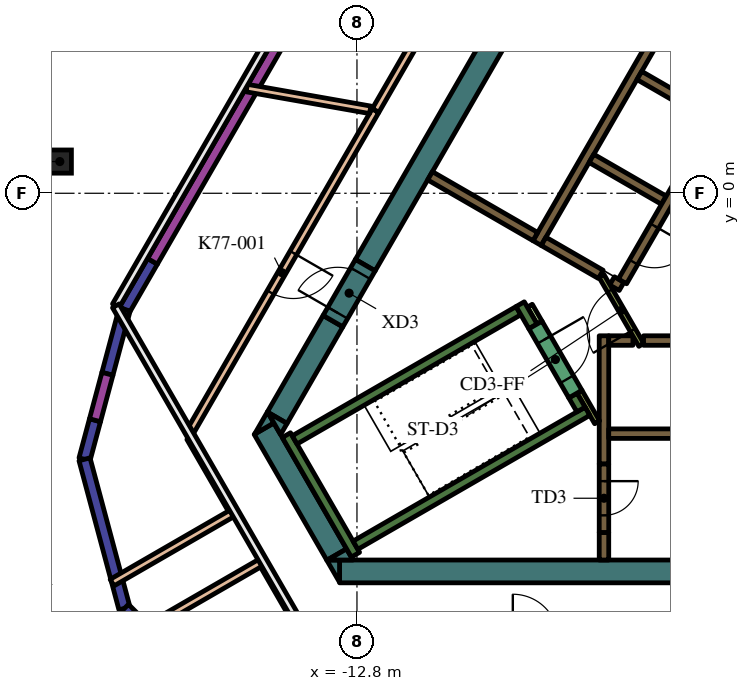
"""IFC4 building model, lengths in metres.
Left out: names, types, materials, properties, quantities, classifications, styles, units other than length and angle.
Written with IfcOpenShell. Run it as: python <this file> out.ifc"""

import sys

from ifc_helpers import new_model, si_unit, direction, frame, frame_2d, origin, origin_2d, place, context, subcontext, project, spatial, polyline, rectangle, hollow_circle, outline, extrude, element, fill, save


model = new_model("IFC4")
c1 = context("Model", 3, precision=1e-05, world=origin(), true_north=direction((0.0, 1.0)))
c2 = subcontext(c1, "Body", "Model", "MODEL_VIEW")
j1 = project(units=[si_unit("LENGTHUNIT", "METRE"), si_unit("PLANEANGLEUNIT", "RADIAN")], contexts=[c1])
p1 = place(None, origin())
s1 = spatial("IfcSite", under=j1, at=p1, CompositionType="ELEMENT")
p2 = place(p1, origin())
s2 = spatial("IfcBuilding", under=s1, at=p2, CompositionType="ELEMENT")
p3 = place(p2, frame((0.0, 0.0, 331.8)))
s3 = spatial("IfcBuildingStorey", under=s2, at=p3, CompositionType="ELEMENT", Elevation=331.8)
p4 = place(p3, frame((-20.619, 0.834, 0.0), z_axis=(0.0, 0.0, 1.0), x_axis=(1.0, 0.0, 0.0)))
e1 = element("IfcColumn", 1, at=p4, inside=s3, PredefinedType="COLUMN", context=c2, shape_type="SweptSolid", body=[
    extrude(hollow_circle(Radius=0.305, WallThickness=0.025, at=origin_2d()), origin(), (0.0, 0.0, 1.0), 4.2),
])
p5 = place(p3, frame((8.904, -9.95, 0.0), z_axis=(0.0, 0.0, 1.0), x_axis=(-1.0, 0.0, 0.0)))
e2 = element("IfcWall", 2, at=p5, inside=s3, PredefinedType="SOLIDWALL", context=c2, shape_type="SweptSolid", body=[
    extrude(rectangle(XDim=22.161, YDim=0.6, at=frame_2d((11.081, 0.0))), origin(), (0.0, 0.0, 1.0), 4.2),
])
p6 = place(p3, origin())
e3 = element("IfcWall", 3, at=p6, inside=s3, PredefinedType="SOLIDWALL", context=c2, shape_type="SweptSolid", body=[
    extrude(outline(polyline([(-13.597, -9.65), (-13.259, -9.65), (-13.259, -10.236), (-13.597, -9.65)])), origin(), (0.0, 0.0, 1.0), 4.2),
])
p7 = place(p3, frame((-13.333, -9.506, 0.0), z_axis=(0.0, 0.0, 1.0), x_axis=(-0.500019073792, 0.866014391245, 0.0)))
e4 = element("IfcWall", 4, at=p7, inside=s3, PredefinedType="SOLIDWALL", context=c2, shape_type="SweptSolid", body=[
    extrude(rectangle(XDim=3.823, YDim=0.6, at=frame_2d((1.912, 0.0))), origin(), (0.0, 0.0, 1.0), 4.2),
])
e5 = element("IfcWall", 5, at=p6, inside=s3, PredefinedType="SOLIDWALL", context=c2, shape_type="SweptSolid", body=[
    extrude(outline(polyline([(-14.987, -6.043), (-15.493, -6.335), (-15.156, -5.75), (-14.987, -6.043)])), origin(), (0.0, 0.0, 1.0), 4.2),
])
e6 = element("IfcWall", 6, at=p6, inside=s3, PredefinedType="SOLIDWALL", context=c2, shape_type="SweptSolid", body=[
    extrude(outline(polyline([(-12.904, -9.65), (-13.58, -9.65), (-13.073, -9.357), (-12.904, -9.65)])), origin(), (0.0, 0.0, 1.0), 4.2),
])
p8 = place(p3, frame((-13.432, -3.364, 0.0), z_axis=(0.0, 0.0, 1.0), x_axis=(-0.499960127962, -0.866048422692, 0.0)))
e7 = element("IfcWall", 7, at=p8, inside=s3, PredefinedType="SOLIDWALL", context=c2, shape_type="SweptSolid", body=[
    extrude(rectangle(XDim=2.934, YDim=0.6, at=frame_2d((1.467, 0.0))), origin(), (0.0, 0.0, 1.0), 4.2),
])
e8 = element("IfcWall", 8, at=p6, inside=s3, PredefinedType="SOLIDWALL", context=c2, shape_type="SweptSolid", body=[
    extrude(outline(polyline([(-14.809, -6.35), (-15.147, -5.764), (-14.64, -6.057), (-14.809, -6.35)])), origin(), (0.0, 0.0, 1.0), 4.2),
])
p9 = place(p3, frame((-4.652, 11.842, 0.0), z_axis=(0.0, 0.0, 1.0), x_axis=(-0.500003640647, -0.866023301845, 0.0)))
e9 = element("IfcWall", 9, at=p9, inside=s3, PredefinedType="SOLIDWALL", context=c2, shape_type="SweptSolid", body=[
    extrude(rectangle(XDim=15.858, YDim=0.6, at=frame_2d((7.929, 0.0))), origin(), (0.0, 0.0, 1.0), 4.2),
])
p10 = place(p3, frame((-12.84, -9.511, 0.0), z_axis=(0.0, 0.0, 1.0), x_axis=(-0.499997733992, 0.866026712061, 0.0)))
e10 = element("IfcWall", 10, at=p10, inside=s3, PredefinedType="SOLIDWALL", context=c2, shape_type="SweptSolid", body=[
    extrude(rectangle(XDim=3.634, YDim=0.25, at=frame_2d((1.817, 0.0))), origin(), (0.0, 0.0, 1.0), 4.2),
])
p11 = place(p3, frame((-14.44, -6.49, 0.0), z_axis=(0.0, 0.0, 1.0), x_axis=(0.866022966069, 0.500004222222, 0.0)))
e11 = element("IfcWall", 11, at=p11, inside=s3, PredefinedType="SOLIDWALL", context=c2, shape_type="SweptSolid", body=[
    extrude(rectangle(XDim=6.8, YDim=0.25, at=frame_2d((3.4, 0.0))), origin(), (0.0, 0.0, 1.0), 4.2),
])
p12 = place(p3, frame((-8.168, -3.503, 0.0), z_axis=(0.0, 0.0, 1.0), x_axis=(-0.499952099219, 0.866053057547, 0.0)))
e12 = element("IfcWall", 12, at=p12, inside=s3, PredefinedType="SOLIDWALL", context=c2, shape_type="SweptSolid", body=[
    extrude(rectangle(XDim=0.675, YDim=0.25, at=frame_2d((0.337, 0.0))), origin(), (0.0, 0.0, 1.0), 4.2),
])
p13 = place(p3, frame((-12.84, -9.261, 0.0), z_axis=(0.0, 0.0, 1.0), x_axis=(0.866016039709, 0.500016218704, 0.0)))
e13 = element("IfcWall", 13, at=p13, inside=s3, PredefinedType="SOLIDWALL", context=c2, shape_type="SweptSolid", body=[
    extrude(rectangle(XDim=7.05, YDim=0.25, at=frame_2d((3.525, 0.0))), origin(), (0.0, 0.0, 1.0), 4.2),
])
p14 = place(p3, frame((-6.905, -5.69, 0.0), z_axis=(0.0, 0.0, 1.0), x_axis=(-0.500402024738, 0.865793170242, 0.0)))
e14 = element("IfcWall", 14, at=p14, inside=s3, PredefinedType="SOLIDWALL", context=c2, shape_type="SweptSolid", body=[
    extrude(rectangle(XDim=0.425, YDim=0.25, at=frame_2d((0.212, 0.0))), origin(), (0.0, 0.0, 1.0), 4.2),
])
p15 = place(p3, frame((-5.259, -3.875, 0.0), z_axis=(0.0, 0.0, 1.0), x_axis=(1.0, 0.0, 0.0)))
e15 = element("IfcWall", 15, at=p15, inside=s3, PredefinedType="SOLIDWALL", context=c2, shape_type="SweptSolid", body=[
    extrude(rectangle(XDim=10.489, YDim=0.25, at=frame_2d((5.244, 0.0))), origin(), (0.0, 0.0, 1.0), 4.2),
])
p16 = place(p3, frame((-6.3, -7.125, 0.0), z_axis=(0.0, 0.0, 1.0), x_axis=(0.0, 1.0, 0.0)))
e16 = element("IfcWall", 16, at=p16, inside=s3, PredefinedType="SOLIDWALL", context=c2, shape_type="SweptSolid", body=[
    extrude(rectangle(XDim=3.375, YDim=0.25, at=frame_2d((1.687, 0.0))), origin(), (0.0, 0.0, 1.0), 4.2),
])
p17 = place(p3, frame((-6.175, -3.875, 0.0), z_axis=(0.0, 0.0, 1.0), x_axis=(1.0, 0.0, 0.0)))
e17 = element("IfcWall", 17, at=p17, inside=s3, PredefinedType="SOLIDWALL", context=c2, shape_type="SweptSolid", body=[
    extrude(rectangle(XDim=0.637, YDim=0.25, at=frame_2d((0.318, 0.0))), origin(), (0.0, 0.0, 1.0), 4.2),
])
p18 = place(p3, frame((-6.3, -8.925, 0.0), z_axis=(0.0, 0.0, 1.0), x_axis=(0.0, -1.0, 0.0)))
e18 = element("IfcWall", 18, at=p18, inside=s3, PredefinedType="SOLIDWALL", context=c2, shape_type="SweptSolid", body=[
    extrude(rectangle(XDim=0.725, YDim=0.25, at=frame_2d((0.363, 0.0))), origin(), (0.0, 0.0, 1.0), 4.2),
])
p19 = place(p3, frame((-8.06, -1.311, 0.0), z_axis=(0.0, 0.0, 1.0), x_axis=(0.50000273126, 0.866023826885, 0.0)))
e19 = element("IfcWall", 19, at=p19, inside=s3, PredefinedType="SOLIDWALL", context=c2, shape_type="SweptSolid", body=[
    extrude(rectangle(XDim=10.33, YDim=0.25, at=frame_2d((5.165, 0.0))), origin(), (0.0, 0.0, 1.0), 4.2),
])
for number, where, z_axis, x_axis in (
    (20, (-5.369, 3.1, 0.0), (0.0, 0.0, 1.0), (0.866, -0.5, 0.0)),
    (21, (-4.724, -0.182, 0.0), (0.0, 0.0, 1.0), (-0.866, 0.5, 0.0)),
):
    element("IfcWall", number, at=place(p3, frame(where, z_axis=z_axis, x_axis=x_axis)), inside=s3, PredefinedType="SOLIDWALL", context=c2, shape_type="SweptSolid", body=[
        extrude(rectangle(XDim=2.2, YDim=0.25, at=frame_2d((1.1, 0.0))), origin(), (0.0, 0.0, 1.0), 4.2),
    ])
p20 = place(p3, frame((-6.088, -2.305, 0.0), z_axis=(0.0, 0.0, 1.0), x_axis=(0.866059450854, -0.499941024108, 0.0)))
e22 = element("IfcWall", 22, at=p20, inside=s3, PredefinedType="SOLIDWALL", context=c2, shape_type="SweptSolid", body=[
    extrude(rectangle(XDim=0.29, YDim=0.25, at=frame_2d((0.145, 0.0))), origin(), (0.0, 0.0, 1.0), 4.2),
])
p21 = place(p3, frame((-7.889, -1.265, 0.0), z_axis=(0.0, 0.0, 1.0), x_axis=(0.865986741702, -0.500066958712, 0.0)))
e23 = element("IfcWall", 23, at=p21, inside=s3, PredefinedType="SOLIDWALL", context=c2, shape_type="SweptSolid", body=[
    extrude(rectangle(XDim=1.738, YDim=0.25, at=frame_2d((0.869, 0.0))), origin(), (0.0, 0.0, 1.0), 4.2),
])
p22 = place(p3, frame((-8.106, -1.14, 0.0), z_axis=(0.0, 0.0, 1.0), x_axis=(-0.866008981251, 0.500028443584, 0.0)))
e24 = element("IfcWall", 24, at=p22, inside=s3, PredefinedType="SOLIDWALL", context=c2, shape_type="SweptSolid", body=[
    extrude(rectangle(XDim=3.2, YDim=0.25, at=frame_2d((1.6, 0.0))), origin(), (0.0, 0.0, 1.0), 4.2),
])
p23 = place(p3, frame((-8.252, -2.958, 0.0), z_axis=(0.0, 0.0, 1.0), x_axis=(0.500174715838, -0.865924508047, 0.0)))
e25 = element("IfcWall", 25, at=p23, inside=s3, PredefinedType="PARTITIONING", context=c2, shape_type="SweptSolid", body=[
    extrude(rectangle(XDim=0.514, YDim=0.15, at=frame_2d((0.257, 0.0))), origin(), (0.0, 0.0, 1.0), 3.45),
])
p24 = place(p3, frame((-6.48, -6.027, 0.0), z_axis=(0.0, 0.0, 1.0), x_axis=(-0.499927229454, 0.866067413802, 0.0)))
e26 = element("IfcWall", 26, at=p24, inside=s3, PredefinedType="PARTITIONING", context=c2, shape_type="SweptSolid", body=[
    extrude(rectangle(XDim=0.929, YDim=0.15, at=frame_2d((0.464, 0.0))), origin(), (0.0, 0.0, 1.0), 4.2),
])
p25 = place(p3, frame((-6.175, -6.325, 0.0), z_axis=(0.0, 0.0, 1.0), x_axis=(1.0, 0.0, 0.0)))
e27 = element("IfcWall", 27, at=p25, inside=s3, PredefinedType="SOLIDWALL", context=c2, shape_type="SweptSolid", body=[
    extrude(rectangle(XDim=12.35, YDim=0.25, at=frame_2d((6.175, 0.0))), origin(), (0.0, 0.0, 1.0), 4.2),
])
p26 = place(p25, frame((3.205, 0.0, 0.0)))
e28 = element("IfcOpeningElement", 28, at=p26, cuts=e27, PredefinedType="OPENING", context=c2, shape_type="SweptSolid", body=[
    extrude(rectangle(XDim=0.9, YDim=2.1, at=frame_2d((0.45, 1.05))), frame((0.0, 0.135, 0.0), z_axis=(0.0, -1.0, 0.0), x_axis=(1.0, 0.0, 0.0)), (0.0, 0.0, 1.0), 0.27),
])
p27 = place(p25, frame((8.145, 0.0, 0.0)))
e29 = element("IfcOpeningElement", 29, at=p27, cuts=e27, PredefinedType="OPENING", context=c2, shape_type="SweptSolid", body=[
    extrude(rectangle(XDim=1.1, YDim=2.1, at=frame_2d((0.55, 1.05))), frame((0.0, 0.135, 0.0), z_axis=(0.0, -1.0, 0.0), x_axis=(1.0, 0.0, 0.0)), (0.0, 0.0, 1.0), 0.27),
])
p28 = place(p25, frame((10.665, 0.0, 0.0)))
e30 = element("IfcOpeningElement", 30, at=p28, cuts=e27, PredefinedType="OPENING", context=c2, shape_type="SweptSolid", body=[
    extrude(rectangle(XDim=1.1, YDim=2.1, at=frame_2d((0.55, 1.05))), frame((0.0, 0.135, 0.0), z_axis=(0.0, -1.0, 0.0), x_axis=(1.0, 0.0, 0.0)), (0.0, 0.0, 1.0), 0.27),
])
p29 = place(p3, frame((-0.898, 6.194, 0.0), z_axis=(0.0, 0.0, 1.0), x_axis=(-0.499996202215, -0.866027596426, 0.0)))
e31 = element("IfcWall", 31, at=p29, inside=s3, PredefinedType="SOLIDWALL", context=c2, shape_type="SweptSolid", body=[
    extrude(rectangle(XDim=9.83, YDim=0.25, at=frame_2d((4.915, 0.0))), origin(), (0.0, 0.0, 1.0), 4.2),
])
p30 = place(p29, frame((0.585, 0.0, 0.0)))
e32 = element("IfcOpeningElement", 32, at=p30, cuts=e31, PredefinedType="OPENING", context=c2, shape_type="SweptSolid", body=[
    extrude(rectangle(XDim=1.1, YDim=2.1, at=frame_2d((0.55, 1.05))), frame((0.0, 0.135, 0.0), z_axis=(0.0, -1.0, 0.0), x_axis=(1.0, 0.0, 0.0)), (0.0, 0.0, 1.0), 0.27),
])
p31 = place(p29, frame((3.105, 0.0, 0.0)))
e33 = element("IfcOpeningElement", 33, at=p31, cuts=e31, PredefinedType="OPENING", context=c2, shape_type="SweptSolid", body=[
    extrude(rectangle(XDim=1.1, YDim=2.1, at=frame_2d((0.55, 1.05))), frame((0.0, 0.135, 0.0), z_axis=(0.0, -1.0, 0.0), x_axis=(1.0, 0.0, 0.0)), (0.0, 0.0, 1.0), 0.27),
])
p32 = place(p29, frame((5.625, 0.0, 0.0)))
e34 = element("IfcOpeningElement", 34, at=p32, cuts=e31, PredefinedType="OPENING", context=c2, shape_type="SweptSolid", body=[
    extrude(rectangle(XDim=1.1, YDim=2.1, at=frame_2d((0.55, 1.05))), frame((0.0, 0.135, 0.0), z_axis=(0.0, -1.0, 0.0), x_axis=(1.0, 0.0, 0.0)), (0.0, 0.0, 1.0), 0.27),
])
p33 = place(p29, frame((8.145, 0.0, 0.0)))
e35 = element("IfcOpeningElement", 35, at=p33, cuts=e31, PredefinedType="OPENING", context=c2, shape_type="SweptSolid", body=[
    extrude(rectangle(XDim=1.1, YDim=2.1, at=frame_2d((0.55, 1.05))), frame((0.0, 0.135, 0.0), z_axis=(0.0, -1.0, 0.0), x_axis=(1.0, 0.0, 0.0)), (0.0, 0.0, 1.0), 0.27),
])
p34 = place(p3, frame((-8.103, -3.466, 0.0), z_axis=(0.0, 0.0, 1.0), x_axis=(0.500078061341, -0.865980330357, 0.0)))
e36 = element("IfcWall", 36, at=p34, inside=s3, PredefinedType="SOLIDWALL", context=c2, shape_type="SweptSolid", body=[
    extrude(rectangle(XDim=2.1, YDim=0.4, at=frame_2d((1.05, 0.0))), origin(), (0.0, 0.0, 1.0), 4.2),
])
p35 = place(p34, frame((0.45, 0.0, 0.0)))
e37 = element("IfcOpeningElement", 37, at=p35, cuts=e36, PredefinedType="OPENING", context=c2, shape_type="SweptSolid", body=[
    extrude(rectangle(XDim=1.2, YDim=2.1, at=frame_2d((0.6, 1.05))), frame((0.0, 0.21, 0.0), z_axis=(0.0, -1.0, 0.0), x_axis=(1.0, 0.0, 0.0)), (0.0, 0.0, 1.0), 0.42),
])
p36 = place(p3, frame((-6.3, -7.125, 0.0), z_axis=(0.0, 0.0, 1.0), x_axis=(0.0, -1.0, 0.0)))
e38 = element("IfcWall", 38, at=p36, inside=s3, PredefinedType="SOLIDWALL", context=c2, shape_type="SweptSolid", body=[
    extrude(rectangle(XDim=1.8, YDim=0.25, at=frame_2d((0.9, 0.0))), origin(), (0.0, 0.0, 1.0), 4.2),
])
p37 = place(p36, frame((0.45, 0.0, 0.0)))
e39 = element("IfcOpeningElement", 39, at=p37, cuts=e38, PredefinedType="OPENING", context=c2, shape_type="SweptSolid", body=[
    extrude(rectangle(XDim=0.9, YDim=2.1, at=frame_2d((0.45, 1.05))), frame((0.0, 0.135, 0.0), z_axis=(0.0, -1.0, 0.0), x_axis=(1.0, 0.0, 0.0)), (0.0, 0.0, 1.0), 0.27),
])
p38 = place(p3, frame((-5.317, -3.99, 0.0), z_axis=(0.0, 0.0, 1.0), x_axis=(-0.500027713859, 0.866009402589, 0.0)))
e40 = element("IfcWall", 40, at=p38, inside=s3, PredefinedType="PARTITIONING", context=c2, shape_type="SweptSolid", body=[
    extrude(rectangle(XDim=2.1, YDim=0.15, at=frame_2d((1.05, 0.0))), origin(), (0.0, 0.0, 1.0), 4.2),
])
p39 = place(p38, frame((0.45, 0.0, 0.0)))
e41 = element("IfcOpeningElement", 41, at=p39, cuts=e40, PredefinedType="OPENING", context=c2, shape_type="SweptSolid", body=[
    extrude(rectangle(XDim=1.2, YDim=2.1, at=frame_2d((0.6, 1.05))), frame((0.0, 0.085, 0.0), z_axis=(0.0, -1.0, 0.0), x_axis=(1.0, 0.0, 0.0)), (0.0, 0.0, 1.0), 0.17),
])
p40 = place(p3, frame((-13.432, -3.364, 0.0), z_axis=(0.0, 0.0, 1.0), x_axis=(0.500000056704, 0.866025371046, 0.0)))
e42 = element("IfcWall", 42, at=p40, inside=s3, PredefinedType="SOLIDWALL", context=c2, shape_type="SweptSolid", body=[
    extrude(rectangle(XDim=1.7, YDim=0.6, at=frame_2d((0.85, 0.0))), origin(), (0.0, 0.0, 1.0), 4.2),
])
p41 = place(p40, frame((0.25, 0.0, 0.0)))
e43 = element("IfcOpeningElement", 43, at=p41, cuts=e42, PredefinedType="OPENING", context=c2, shape_type="SweptSolid", body=[
    extrude(rectangle(XDim=1.2, YDim=2.1, at=frame_2d((0.6, 1.05))), frame((0.0, 0.31, 0.0), z_axis=(0.0, -1.0, 0.0), x_axis=(1.0, 0.0, 0.0)), (0.0, 0.0, 1.0), 0.62),
])
p42 = place(p3, frame((-12.314, 2.171, 0.0), z_axis=(0.0, 0.0, 1.0), x_axis=(-0.500003092839, -0.866023618125, 0.0)))
e44 = element("IfcWall", 44, at=p42, inside=s3, PredefinedType="PARTITIONING", context=c2, shape_type="SweptSolid", body=[
    extrude(rectangle(XDim=9.84, YDim=0.2, at=frame_2d((4.92, 0.0))), origin(), (0.0, 0.0, 1.0), 3.45),
])
p43 = place(p42, frame((4.32, 0.0, 0.0)))
e45 = element("IfcOpeningElement", 45, at=p43, cuts=e44, PredefinedType="OPENING", context=c2, shape_type="SweptSolid", body=[
    extrude(rectangle(XDim=1.2, YDim=2.1, at=frame_2d((0.6, 1.05))), frame((0.0, 0.11, 0.0), z_axis=(0.0, -1.0, 0.0), x_axis=(1.0, 0.0, 0.0)), (0.0, 0.0, 1.0), 0.22),
])
p44 = place(p3, frame((-8.042, 9.57, 0.0), z_axis=(0.0, 0.0, 1.0), x_axis=(-0.499966798825, -0.866044571643, 0.0)))
e46 = element("IfcWall", 46, at=p44, inside=s3, PredefinedType="PARTITIONING", context=c2, shape_type="SweptSolid", body=[
    extrude(rectangle(XDim=8.534, YDim=0.2, at=frame_2d((4.267, 0.0))), origin(), (0.0, 0.0, 1.0), 3.45),
])
p45 = place(p44, frame((3.667, 0.0, 0.0)))
e47 = element("IfcOpeningElement", 47, at=p45, cuts=e46, PredefinedType="OPENING", context=c2, shape_type="SweptSolid", body=[
    extrude(rectangle(XDim=1.2, YDim=2.1, at=frame_2d((0.6, 1.05))), frame((0.0, 0.11, 0.0), z_axis=(0.0, -1.0, 0.0), x_axis=(1.0, 0.0, 0.0)), (0.0, 0.0, 1.0), 0.22),
])
for number, where, z_axis, x_axis in (
    (48, (-19.244, -10.245, 0.0), (0.0, 0.0, 1.0), (0.866, 0.5, 0.0)),
    (49, (-15.3, -9.699, 0.0), (0.0, 0.0, 1.0), (-0.866, -0.5, 0.0)),
):
    element("IfcWall", number, at=place(p3, frame(where, z_axis=z_axis, x_axis=x_axis)), inside=s3, PredefinedType="PARTITIONING", context=c2, shape_type="SweptSolid", body=[
        extrude(rectangle(XDim=3.688, YDim=0.2, at=frame_2d((1.844, 0.0))), origin(), (0.0, 0.0, 1.0), 3.45),
    ])
p46 = place(p3, frame((-15.701, 2.769, 0.0), z_axis=(0.0, 0.0, 1.0), x_axis=(0.984804409481, -0.173667138707, 0.0)))
e50 = element("IfcWall", 50, at=p46, inside=s3, PredefinedType="PARTITIONING", context=c2, shape_type="SweptSolid", body=[
    extrude(rectangle(XDim=3.299, YDim=0.2, at=frame_2d((1.65, 0.0))), origin(), (0.0, 0.0, 1.0), 3.45),
])
for number, where, z_axis, x_axis in (
    (51, (-16.1, -8.314, 0.0), (0.0, 0.0, 1.0), (-0.5, 0.866, 0.0)),
    (52, (-14.161, -11.672, 0.0), (0.0, 0.0, 1.0), (-0.5, 0.866, 0.0)),
):
    element("IfcWall", number, at=place(p3, frame(where, z_axis=z_axis, x_axis=x_axis)), inside=s3, PredefinedType="PARTITIONING", context=c2, shape_type="SweptSolid", body=[
        extrude(rectangle(XDim=2.178, YDim=0.2, at=frame_2d((1.089, 0.0))), origin(), (0.0, 0.0, 1.0), 3.45),
    ])
p47 = place(p3, frame((-7.54, 16.64, 0.0), z_axis=(0.0, 0.0, 1.0), x_axis=(-0.500002158106, -0.866024157798, 0.0)))
e53 = element("IfcWall", 53, at=p47, inside=s3, PredefinedType="SOLIDWALL", context=c2, shape_type="SweptSolid", body=[
    extrude(rectangle(XDim=21.282, YDim=0.3, at=frame_2d((10.641, 0.0))), origin(), (0.0, 0.0, 1.0), 3.45),
])
p48 = place(p3, frame((-18.181, -1.79, 0.0), z_axis=(0.0, 0.0, 1.0), x_axis=(-0.500049712553, -0.865996700326, 0.0)))
e54 = element("IfcWall", 54, at=p48, inside=s3, PredefinedType="SOLIDWALL", context=c2, shape_type="SweptSolid", body=[
    extrude(rectangle(XDim=1.464, YDim=0.3, at=frame_2d((0.732, 0.0))), origin(), (0.0, 0.0, 1.0), 3.95),
])
p49 = place(p3, frame((-18.913, -3.058, 0.0), z_axis=(0.0, 0.0, 1.0), x_axis=(-0.258824282894, -0.965924422812, 0.0)))
e55 = element("IfcWall", 55, at=p49, inside=s3, PredefinedType="SOLIDWALL", context=c2, shape_type="SweptSolid", body=[
    extrude(rectangle(XDim=1.753, YDim=0.3, at=frame_2d((0.876, 0.0))), origin(), (0.0, 0.0, 1.0), 3.95),
])
p50 = place(p3, frame((-19.366, -4.751, 0.0), z_axis=(0.0, 0.0, 1.0), x_axis=(-0.258816538161, -0.965926498018, 0.0)))
e56 = element("IfcWall", 56, at=p50, inside=s3, PredefinedType="SOLIDWALL", context=c2, shape_type="SweptSolid", body=[
    extrude(rectangle(XDim=1.264, YDim=0.3, at=frame_2d((0.632, 0.0))), origin(), (0.0, 0.0, 1.0), 3.45),
])
p51 = place(p3, frame((-19.694, -5.972, 0.0), z_axis=(0.0, 0.0, 1.0), x_axis=(-0.258690231517, -0.96596033258, 0.0)))
e57 = element("IfcWall", 57, at=p51, inside=s3, PredefinedType="SOLIDWALL", context=c2, shape_type="SweptSolid", body=[
    extrude(rectangle(XDim=1.064, YDim=0.3, at=frame_2d((0.532, 0.0))), origin(), (0.0, 0.0, 1.0), 3.95),
])
for number, where, z_axis, x_axis in (
    (58, (-19.969, -7.0, 0.0), (0.0, 0.0, 1.0), (0.259, -0.966, 0.0)),
    (59, (-18.918, -10.922, 0.0), (0.0, 0.0, 1.0), (0.707, -0.707, 0.0)),
):
    element("IfcWall", number, at=place(p3, frame(where, z_axis=z_axis, x_axis=x_axis)), inside=s3, PredefinedType="SOLIDWALL", context=c2, shape_type="SweptSolid", body=[
        extrude(rectangle(XDim=4.061, YDim=0.3, at=frame_2d((2.03, 0.0))), origin(), (0.0, 0.0, 1.0), 3.95),
    ])
p52 = place(p33, origin())
e60 = element("IfcDoor", 60, at=p52, inside=s3, OperationType="DOUBLE_DOOR_SLIDING", PredefinedType="DOOR", context=c2, shape_type="SweptSolid", body=[
    extrude(rectangle(XDim=1.1, YDim=2.1, at=frame_2d((0.55, 1.05))), frame((0.0, 0.025, 0.0), z_axis=(0.0, -1.0, 0.0), x_axis=(1.0, 0.0, 0.0)), (0.0, 0.0, 1.0), 0.05),
])
fill(e35, e60)
p53 = place(p35, origin())
e61 = element("IfcDoor", 61, at=p53, inside=s3, OperationType="SINGLE_SWING_LEFT", PredefinedType="DOOR", context=c2, shape_type="SweptSolid", body=[
    extrude(rectangle(XDim=1.2, YDim=2.1, at=frame_2d((0.6, 1.05))), frame((0.0, 0.025, 0.0), z_axis=(0.0, -1.0, 0.0), x_axis=(1.0, 0.0, 0.0)), (0.0, 0.0, 1.0), 0.05),
])
fill(e37, e61)
p54 = place(p37, origin())
e62 = element("IfcDoor", 62, at=p54, inside=s3, OperationType="SINGLE_SWING_LEFT", PredefinedType="DOOR", context=c2, shape_type="SweptSolid", body=[
    extrude(rectangle(XDim=0.9, YDim=2.1, at=frame_2d((0.45, 1.05))), frame((0.0, 0.025, 0.0), z_axis=(0.0, -1.0, 0.0), x_axis=(1.0, 0.0, 0.0)), (0.0, 0.0, 1.0), 0.05),
])
fill(e39, e62)
p55 = place(p39, origin())
e63 = element("IfcDoor", 63, at=p55, inside=s3, OperationType="SINGLE_SWING_LEFT", PredefinedType="DOOR", context=c2, shape_type="SweptSolid", body=[
    extrude(rectangle(XDim=1.2, YDim=2.1, at=frame_2d((0.6, 1.05))), frame((0.0, 0.025, 0.0), z_axis=(0.0, -1.0, 0.0), x_axis=(1.0, 0.0, 0.0)), (0.0, 0.0, 1.0), 0.05),
])
fill(e41, e63)
p56 = place(p41, origin())
e64 = element("IfcDoor", 64, at=p56, inside=s3, OperationType="SINGLE_SWING_LEFT", PredefinedType="DOOR", context=c2, shape_type="SweptSolid", body=[
    extrude(rectangle(XDim=1.2, YDim=2.1, at=frame_2d((0.6, 1.05))), frame((0.0, 0.025, 0.0), z_axis=(0.0, -1.0, 0.0), x_axis=(1.0, 0.0, 0.0)), (0.0, 0.0, 1.0), 0.05),
])
fill(e43, e64)
p57 = place(p43, origin())
e65 = element("IfcDoor", 65, at=p57, inside=s3, OperationType="SINGLE_SWING_RIGHT", PredefinedType="DOOR", context=c2, shape_type="SweptSolid", body=[
    extrude(rectangle(XDim=1.2, YDim=2.1, at=frame_2d((0.6, 1.05))), frame((0.0, 0.025, 0.0), z_axis=(0.0, -1.0, 0.0), x_axis=(1.0, 0.0, 0.0)), (0.0, 0.0, 1.0), 0.05),
])
fill(e45, e65)
save(model, sys.argv[1])
